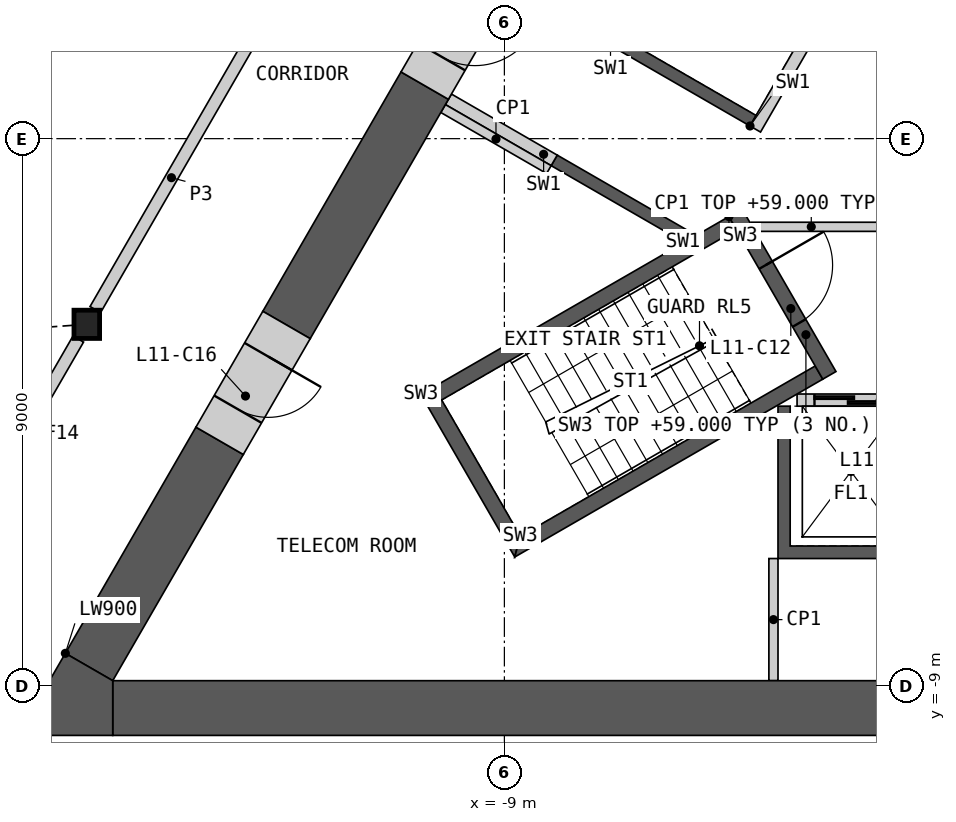
"""IFC4 building model, lengths in metres.
Left out: names, types, materials, properties, quantities, classifications, styles, units other than length and angle.
Written with IfcOpenShell. Run it as: python <this file> out.ifc"""

import sys

from ifc_helpers import new_model, si_unit, direction, frame, frame_2d, origin, origin_2d, place, context, subcontext, project, spatial, polyline, rectangle, i_section, outline, extrude, element, fill, save


model = new_model("IFC4")
c1 = context("Model", 3, precision=1e-05, world=origin(), true_north=direction((0.0, 1.0)))
c2 = subcontext(c1, "Body", "Model", "MODEL_VIEW")
j1 = project(units=[si_unit("LENGTHUNIT", "METRE"), si_unit("PLANEANGLEUNIT", "RADIAN")], contexts=[c1])
p1 = place(None, origin())
s1 = spatial("IfcSite", under=j1, at=p1, CompositionType="ELEMENT")
p2 = place(p1, origin())
s2 = spatial("IfcBuilding", under=s1, at=p2, CompositionType="ELEMENT")
p3 = place(p2, frame((0.0, 0.0, 55.2)))
s3 = spatial("IfcBuildingStorey", under=s2, at=p3, CompositionType="ELEMENT", Elevation=55.2)
p4 = place(p3, frame((-15.868, -3.054, 0.0), z_axis=(0.0, 0.0, 1.0), x_axis=(1.0, 0.0, 0.0)))
e1 = element("IfcColumn", 1, at=p4, inside=s3, PredefinedType="COLUMN", context=c2, shape_type="SweptSolid", body=[
    extrude(i_section(OverallWidth=0.421, OverallDepth=0.465, WebThickness=0.045, FlangeThickness=0.072, at=origin_2d()), origin(), (0.0, 0.0, 1.0), 4.2),
])
p5 = place(p3, origin())
e2 = element("IfcWall", 2, at=p5, inside=s3, PredefinedType="SHEAR", context=c2, shape_type="SweptSolid", body=[
    extrude(outline(polyline([(4.5, -4.4), (4.5, -6.906), (-4.5, -6.906), (-4.5, -4.4), (-4.3, -4.4), (-4.3, -6.7), (-2.3, -6.7), (-2.3, -4.4), (-2.1, -4.4), (-2.1, -6.7), (-0.1, -6.7), (-0.1, -4.4), (0.1, -4.4), (0.1, -6.7), (2.1, -6.7), (2.1, -4.4), (2.3, -4.4), (2.3, -6.7), (4.3, -6.7), (4.3, -4.4), (4.5, -4.4)])), origin(), (0.0, 0.0, 1.0), 3.8),
])
p6 = place(p3, frame((-4.187, -4.3, 0.0), z_axis=(0.0, 0.0, 1.0), x_axis=(1.0, 0.0, 0.0)))
e3 = element("IfcWall", 3, at=p6, inside=s3, PredefinedType="SOLIDWALL", context=c2, shape_type="SweptSolid", body=[
    extrude(rectangle(XDim=8.373, YDim=0.2, at=frame_2d((4.187, 0.0))), origin(), (0.0, 0.0, 1.0), 3.8),
])
p7 = place(p6, frame((0.287, 0.0, 0.0)))
e4 = element("IfcOpeningElement", 4, at=p7, cuts=e3, PredefinedType="OPENING", context=c2, shape_type="SweptSolid", body=[
    extrude(rectangle(XDim=1.2, YDim=2.1, at=frame_2d((0.6, 1.05))), frame((0.0, 0.11, 0.0), z_axis=(0.0, -1.0, 0.0), x_axis=(1.0, 0.0, 0.0)), (0.0, 0.0, 1.0), 0.22),
])
p8 = place(p6, frame((2.387, 0.0, 0.0)))
e5 = element("IfcOpeningElement", 5, at=p8, cuts=e3, PredefinedType="OPENING", context=c2, shape_type="SweptSolid", body=[
    extrude(rectangle(XDim=1.4, YDim=2.1, at=frame_2d((0.7, 1.05))), frame((0.0, 0.11, 0.0), z_axis=(0.0, -1.0, 0.0), x_axis=(1.0, 0.0, 0.0)), (0.0, 0.0, 1.0), 0.22),
])
p9 = place(p6, frame((4.737, 0.0, 0.0)))
e6 = element("IfcOpeningElement", 6, at=p9, cuts=e3, PredefinedType="OPENING", context=c2, shape_type="SweptSolid", body=[
    extrude(rectangle(XDim=1.1, YDim=2.1, at=frame_2d((0.55, 1.05))), frame((0.0, 0.11, 0.0), z_axis=(0.0, -1.0, 0.0), x_axis=(1.0, 0.0, 0.0)), (0.0, 0.0, 1.0), 0.22),
])
p10 = place(p6, frame((6.887, 0.0, 0.0)))
e7 = element("IfcOpeningElement", 7, at=p10, cuts=e3, PredefinedType="OPENING", context=c2, shape_type="SweptSolid", body=[
    extrude(rectangle(XDim=1.2, YDim=2.1, at=frame_2d((0.6, 1.05))), frame((0.0, 0.11, 0.0), z_axis=(0.0, -1.0, 0.0), x_axis=(1.0, 0.0, 0.0)), (0.0, 0.0, 1.0), 0.22),
])
p11 = place(p3, origin())
e8 = element("IfcWall", 8, at=p11, inside=s3, PredefinedType="SHEAR", context=c2, shape_type="SweptSolid", body=[
    extrude(outline(polyline([(-6.061, -1.697), (-8.231, -0.444), (-8.131, -0.271), (-5.96, -1.524), (-6.061, -1.697)])), origin(), (0.0, 0.0, 1.0), 3.8),
])
p12 = place(p3, origin())
e9 = element("IfcWall", 9, at=p12, inside=s3, PredefinedType="SHEAR", context=c2, shape_type="SweptSolid", body=[
    extrude(outline(polyline([(-4.96, 0.208), (-7.131, 1.461), (-5.931, 3.54), (-3.76, 2.287), (-3.861, 2.113), (-5.852, 3.263), (-6.852, 1.531), (-4.861, 0.381), (-4.96, 0.208)])), origin(), (0.0, 0.0, 1.0), 3.8),
])
p13 = place(p3, frame((-1.631, 5.776, 0.0), z_axis=(0.0, 0.0, 1.0), x_axis=(-0.499992876559, -0.866029516466, 0.0)))
e10 = element("IfcWall", 10, at=p13, inside=s3, PredefinedType="SOLIDWALL", context=c2, shape_type="SweptSolid", body=[
    extrude(rectangle(XDim=6.486, YDim=0.2, at=frame_2d((3.243, 0.0))), origin(), (0.0, 0.0, 1.0), 3.8),
])
p14 = place(p13, frame((0.437, 0.0, 0.0)))
e11 = element("IfcOpeningElement", 11, at=p14, cuts=e10, PredefinedType="OPENING", context=c2, shape_type="SweptSolid", body=[
    extrude(rectangle(XDim=0.9, YDim=2.1, at=frame_2d((0.45, 1.05))), frame((0.0, 0.11, 0.0), z_axis=(0.0, -1.0, 0.0), x_axis=(1.0, 0.0, 0.0)), (0.0, 0.0, 1.0), 0.22),
])
p15 = place(p13, frame((2.637, 0.0, 0.0)))
e12 = element("IfcOpeningElement", 12, at=p15, cuts=e10, PredefinedType="OPENING", context=c2, shape_type="SweptSolid", body=[
    extrude(rectangle(XDim=0.9, YDim=2.1, at=frame_2d((0.45, 1.05))), frame((0.0, 0.11, 0.0), z_axis=(0.0, -1.0, 0.0), x_axis=(1.0, 0.0, 0.0)), (0.0, 0.0, 1.0), 0.22),
])
p16 = place(p3, frame((-8.181, -0.357, 0.0), z_axis=(0.0, 0.0, 1.0), x_axis=(-0.866035824272, 0.499981950752, 0.0)))
e13 = element("IfcWall", 13, at=p16, inside=s3, PredefinedType="SHEAR", context=c2, shape_type="SweptSolid", body=[
    extrude(rectangle(XDim=2.009, YDim=0.2, at=frame_2d((1.004, 0.0))), origin(), (0.0, 0.0, 1.0), 3.8),
])
p17 = place(p3, frame((-4.941, -1.45, 0.0), z_axis=(0.0, 0.0, 1.0), x_axis=(1.0, 0.0, 0.0)))
e14 = element("IfcWall", 14, at=p17, inside=s3, PredefinedType="PARTITIONING", context=c2, shape_type="SweptSolid", body=[
    extrude(rectangle(XDim=9.882, YDim=0.15, at=frame_2d((4.941, 0.0))), origin(), (0.0, 0.0, 1.0), 3.8),
])
p18 = place(p17, frame((4.391, 0.0, 0.0)))
e15 = element("IfcOpeningElement", 15, at=p18, cuts=e14, PredefinedType="OPENING", context=c2, shape_type="SweptSolid", body=[
    extrude(rectangle(XDim=1.1, YDim=2.1, at=frame_2d((0.55, 1.05))), frame((0.0, 0.085, 0.0), z_axis=(0.0, -1.0, 0.0), x_axis=(1.0, 0.0, 0.0)), (0.0, 0.0, 1.0), 0.17),
])
p19 = place(p3, origin())
e16 = element("IfcWall", 16, at=p19, inside=s3, PredefinedType="SHEAR", context=c2, shape_type="SweptSolid", body=[
    extrude(outline(polyline([(-5.307, -1.281), (-10.374, -4.206), (-10.032, -4.298), (-5.182, -1.498), (-5.307, -1.281)])), origin(), (0.0, 0.0, 1.0), 3.8),
])
p20 = place(p3, origin())
e17 = element("IfcWall", 17, at=p20, inside=s3, PredefinedType="SHEAR", context=c2, shape_type="SweptSolid", body=[
    extrude(outline(polyline([(-10.374, -4.206), (-8.83, -6.881), (-8.738, -6.539), (-10.032, -4.298), (-10.374, -4.206)])), origin(), (0.0, 0.0, 1.0), 3.8),
])
p21 = place(p3, origin())
e18 = element("IfcWall", 18, at=p21, inside=s3, PredefinedType="SHEAR", context=c2, shape_type="SweptSolid", body=[
    extrude(outline(polyline([(-8.738, -6.539), (-8.83, -6.881), (-3.763, -3.956), (-3.888, -3.739), (-8.738, -6.539)])), origin(), (0.0, 0.0, 1.0), 3.8),
])
p22 = place(p3, frame((-5.199, -1.219, 0.0), z_axis=(0.0, 0.0, 1.0), x_axis=(0.499982516597, -0.866035497597, 0.0)))
e19 = element("IfcWall", 19, at=p22, inside=s3, PredefinedType="SHEAR", context=c2, shape_type="SweptSolid", body=[
    extrude(rectangle(XDim=3.088, YDim=0.25, at=frame_2d((1.544, 0.0))), origin(), (0.0, 0.0, 1.0), 3.8),
])
p23 = place(p22, frame((0.994, 0.0, 0.0)))
e20 = element("IfcOpeningElement", 20, at=p23, cuts=e19, PredefinedType="OPENING", context=c2, shape_type="SweptSolid", body=[
    extrude(rectangle(XDim=1.1, YDim=2.1, at=frame_2d((0.55, 1.05))), frame((0.0, 0.135, 0.0), z_axis=(0.0, -1.0, 0.0), x_axis=(1.0, 0.0, 0.0)), (0.0, 0.0, 1.0), 0.27),
])
p24 = place(p3, frame((-4.575, -6.906, 0.0), z_axis=(0.0, 0.0, 1.0), x_axis=(0.0, -1.0, 0.0)))
e21 = element("IfcWall", 21, at=p24, inside=s3, PredefinedType="PARTITIONING", context=c2, shape_type="SweptSolid", body=[
    extrude(rectangle(XDim=2.009, YDim=0.15, at=frame_2d((1.004, 0.0))), origin(), (0.0, 0.0, 1.0), 3.8),
])
p25 = place(p3, frame((-8.268, -0.509, 0.0), z_axis=(0.0, 0.0, 1.0), x_axis=(-0.866035824272, 0.499981950752, 0.0)))
e22 = element("IfcWall", 22, at=p25, inside=s3, PredefinedType="PARTITIONING", context=c2, shape_type="SweptSolid", body=[
    extrude(rectangle(XDim=2.009, YDim=0.15, at=frame_2d((1.004, 0.0))), origin(), (0.0, 0.0, 1.0), 3.8),
])
p26 = place(p3, frame((-15.441, -9.365, 0.0), z_axis=(0.0, 0.0, 1.0), x_axis=(1.0, 0.0, 0.0)))
e23 = element("IfcWall", 23, at=p26, inside=s3, PredefinedType="SHEAR", context=c2, shape_type="SweptSolid", body=[
    extrude(rectangle(XDim=14.341, YDim=0.9, at=frame_2d((7.17, 0.0))), origin(), (0.0, 0.0, 1.0), 3.8),
])
p27 = place(p3, frame((-10.31, 0.872, 0.0), z_axis=(0.0, 0.0, 1.0), x_axis=(-0.499968858743, -0.866043382451, 0.0)))
e24 = element("IfcWall", 24, at=p27, inside=s3, PredefinedType="SHEAR", context=c2, shape_type="SweptSolid", body=[
    extrude(rectangle(XDim=4.546, YDim=0.9, at=frame_2d((2.273, 0.0))), origin(), (0.0, 0.0, 1.0), 3.8),
])
p28 = place(p3, frame((-13.683, -4.97, 0.0), z_axis=(0.0, 0.0, 1.0), x_axis=(-0.499996331799, -0.866027521611, 0.0)))
e25 = element("IfcWall", 25, at=p28, inside=s3, PredefinedType="SHEAR", context=c2, shape_type="SweptSolid", body=[
    extrude(rectangle(XDim=4.295, YDim=0.9, at=frame_2d((2.148, 0.0))), origin(), (0.0, 0.0, 1.0), 3.8),
])
p29 = place(p3, origin())
e26 = element("IfcWall", 26, at=p29, inside=s3, PredefinedType="SHEAR", context=c2, shape_type="SweptSolid", body=[
    extrude(outline(polyline([(-16.221, -8.465), (-15.441, -8.915), (-15.441, -9.815), (-17.0, -9.815), (-16.221, -8.465)])), origin(), (0.0, 0.0, 1.0), 3.8),
])
p30 = place(p3, frame((-12.583, -3.065, 0.0), z_axis=(0.0, 0.0, 1.0), x_axis=(-0.50002983664, -0.866008176907, 0.0)))
e27 = element("IfcWall", 27, at=p30, inside=s3, PredefinedType="SHEAR", context=c2, shape_type="SweptSolid", body=[
    extrude(rectangle(XDim=2.2, YDim=0.9, at=frame_2d((1.1, 0.0))), origin(), (0.0, 0.0, 1.0), 3.8),
])
p31 = place(p30, frame((0.6, 0.0, 0.0)))
e28 = element("IfcOpeningElement", 28, at=p31, cuts=e27, PredefinedType="OPENING", context=c2, shape_type="SweptSolid", body=[
    extrude(rectangle(XDim=1.0, YDim=2.1, at=frame_2d((0.5, 1.05))), frame((0.0, 0.46, 0.0), z_axis=(0.0, -1.0, 0.0), x_axis=(1.0, 0.0, 0.0)), (0.0, 0.0, 1.0), 0.92),
])
p32 = place(p3, frame((-9.21, 2.777, 0.0), z_axis=(0.0, 0.0, 1.0), x_axis=(-0.500077893725, -0.86598042715, 0.0)))
e29 = element("IfcWall", 29, at=p32, inside=s3, PredefinedType="SHEAR", context=c2, shape_type="SweptSolid", body=[
    extrude(rectangle(XDim=2.2, YDim=0.9, at=frame_2d((1.1, 0.0))), origin(), (0.0, 0.0, 1.0), 3.8),
])
p33 = place(p32, frame((0.55, 0.0, 0.0)))
e30 = element("IfcOpeningElement", 30, at=p33, cuts=e29, PredefinedType="OPENING", context=c2, shape_type="SweptSolid", body=[
    extrude(rectangle(XDim=1.1, YDim=2.1, at=frame_2d((0.55, 1.05))), frame((0.0, 0.46, 0.0), z_axis=(0.0, -1.0, 0.0), x_axis=(1.0, 0.0, 0.0)), (0.0, 0.0, 1.0), 0.92),
])
p34 = place(p3, frame((-15.728, -2.811, 0.0), z_axis=(0.0, 0.0, 1.0), x_axis=(0.49999175339, 0.866030164915, 0.0)))
e31 = element("IfcWall", 31, at=p34, inside=s3, PredefinedType="PARTITIONING", context=c2, shape_type="SweptSolid", body=[
    extrude(rectangle(XDim=10.019, YDim=0.2, at=frame_2d((5.009, 0.0))), origin(), (0.0, 0.0, 1.0), 3.8),
])
p35 = place(p34, frame((7.266, 0.0, 0.0)))
e32 = element("IfcOpeningElement", 32, at=p35, cuts=e31, PredefinedType="OPENING", context=c2, shape_type="SweptSolid", body=[
    extrude(rectangle(XDim=1.0, YDim=2.1, at=frame_2d((0.5, 1.05))), frame((0.0, 0.11, 0.0), z_axis=(0.0, -1.0, 0.0), x_axis=(1.0, 0.0, 0.0)), (0.0, 0.0, 1.0), 0.22),
])
p36 = place(p3, frame((-19.244, -8.902, 0.0), z_axis=(0.0, 0.0, 1.0), x_axis=(0.499984737558, 0.86603421538, 0.0)))
e33 = element("IfcWall", 33, at=p36, inside=s3, PredefinedType="PARTITIONING", context=c2, shape_type="SweptSolid", body=[
    extrude(rectangle(XDim=6.473, YDim=0.2, at=frame_2d((3.236, 0.0))), origin(), (0.0, 0.0, 1.0), 3.8),
])
p37 = place(p36, frame((2.387, 0.0, 0.0)))
e34 = element("IfcOpeningElement", 34, at=p37, cuts=e33, PredefinedType="OPENING", context=c2, shape_type="SweptSolid", body=[
    extrude(rectangle(XDim=1.8, YDim=2.1, at=frame_2d((0.9, 1.05))), frame((0.0, 0.11, 0.0), z_axis=(0.0, -1.0, 0.0), x_axis=(1.0, 0.0, 0.0)), (0.0, 0.0, 1.0), 0.22),
])
p38 = place(p7, origin())
e35 = element("IfcDoor", 35, at=p38, inside=s3, OperationType="SLIDING_TO_LEFT", PredefinedType="DOOR", context=c2, shape_type="SweptSolid", body=[
    extrude(rectangle(XDim=1.2, YDim=2.1, at=frame_2d((0.6, 1.05))), frame((0.0, 0.025, 0.0), z_axis=(0.0, -1.0, 0.0), x_axis=(1.0, 0.0, 0.0)), (0.0, 0.0, 1.0), 0.05),
])
fill(e4, e35)
p39 = place(p23, origin())
e36 = element("IfcDoor", 36, at=p39, inside=s3, OperationType="SINGLE_SWING_LEFT", PredefinedType="DOOR", context=c2, shape_type="SweptSolid", body=[
    extrude(rectangle(XDim=1.1, YDim=2.1, at=frame_2d((0.55, 1.05))), frame((0.0, 0.025, 0.0), z_axis=(0.0, -1.0, 0.0), x_axis=(1.0, 0.0, 0.0)), (0.0, 0.0, 1.0), 0.05),
])
fill(e20, e36)
p40 = place(p31, origin())
e37 = element("IfcDoor", 37, at=p40, inside=s3, OperationType="SINGLE_SWING_LEFT", PredefinedType="DOOR", context=c2, shape_type="SweptSolid", body=[
    extrude(rectangle(XDim=1.0, YDim=2.1, at=frame_2d((0.5, 1.05))), frame((0.0, 0.205, 0.0), z_axis=(0.0, -1.0, 0.0), x_axis=(1.0, 0.0, 0.0)), (0.0, 0.0, 1.0), 0.05),
])
fill(e28, e37)
p41 = place(p33, origin())
e38 = element("IfcDoor", 38, at=p41, inside=s3, OperationType="SINGLE_SWING_LEFT", PredefinedType="DOOR", context=c2, shape_type="SweptSolid", body=[
    extrude(rectangle(XDim=1.1, YDim=2.1, at=frame_2d((0.55, 1.05))), frame((0.0, 0.205, 0.0), z_axis=(0.0, -1.0, 0.0), x_axis=(1.0, 0.0, 0.0)), (0.0, 0.0, 1.0), 0.05),
])
fill(e30, e38)
save(model, sys.argv[1])
